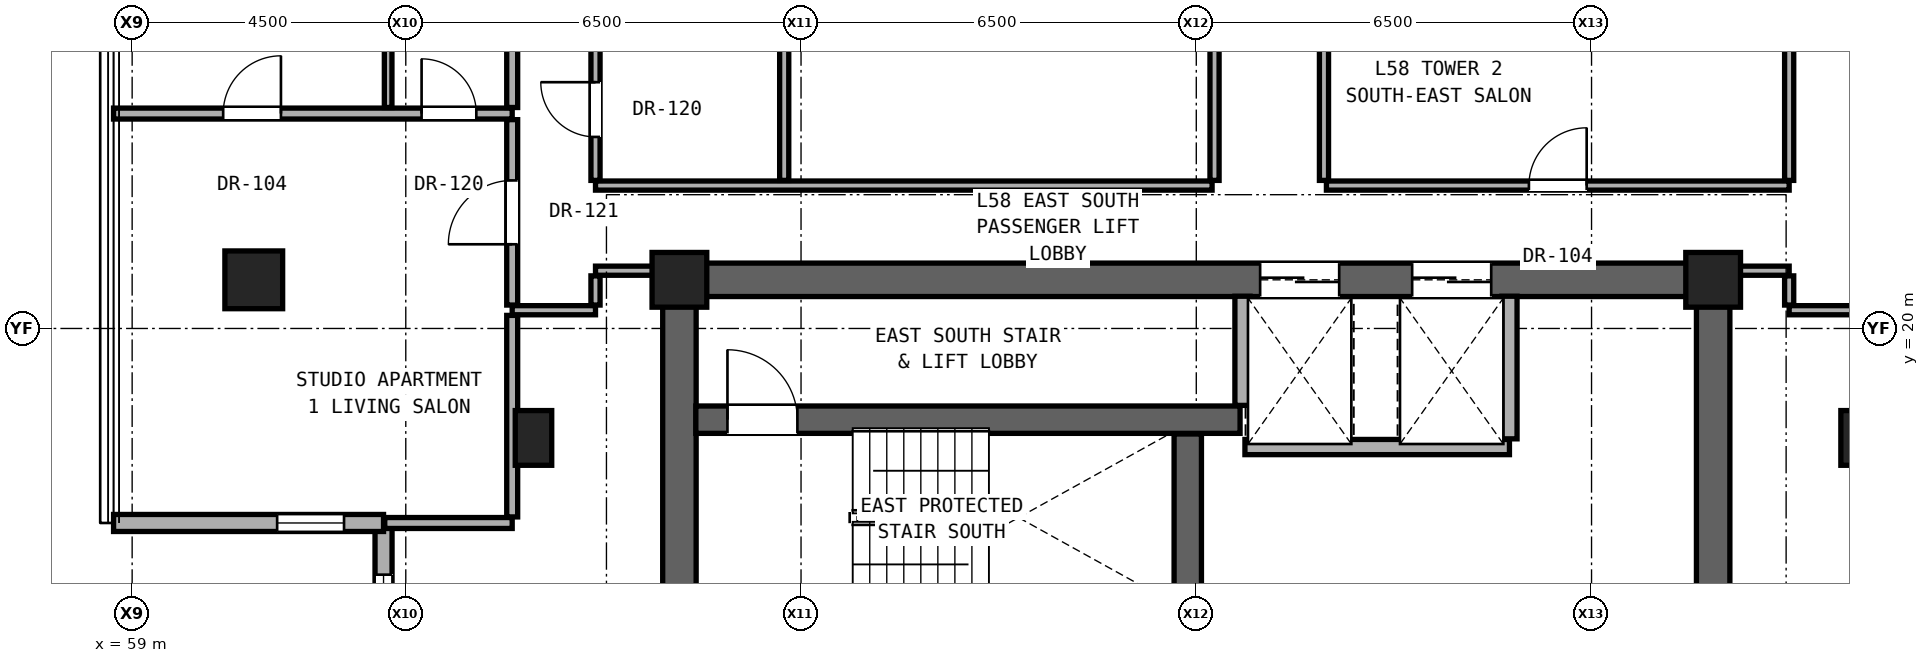
"""IFC4 building model, lengths in metres.
Left out: names, types, materials, properties, quantities, classifications, styles, units other than length and angle.
Written with IfcOpenShell. Run it as: python <this file> out.ifc"""

import sys

from ifc_helpers import new_model, si_unit, direction, frame, frame_2d, origin, origin_2d, place, context, subcontext, project, spatial, rectangle, hollow_rectangle, extrude, element, fill, save


model = new_model("IFC4")
c1 = context("Model", 3, precision=1e-05, world=origin(), true_north=direction((0.0, 1.0)))
c2 = subcontext(c1, "Body", "Model", "MODEL_VIEW")
j1 = project(units=[si_unit("LENGTHUNIT", "METRE"), si_unit("PLANEANGLEUNIT", "RADIAN")], contexts=[c1])
p1 = place(None, origin())
s1 = spatial("IfcSite", under=j1, at=p1, CompositionType="ELEMENT")
p2 = place(p1, origin())
s2 = spatial("IfcBuilding", under=s1, at=p2, CompositionType="ELEMENT")
p3 = place(p2, frame((0.0, 0.0, 203.15)))
s3 = spatial("IfcBuildingStorey", under=s2, at=p3, CompositionType="ELEMENT", Elevation=203.15)
for number, where, z_axis, x_axis in (
    (1, (68.0, 20.8, 0.0), (0.0, 0.0, 1.0), (1.0, 0.0, 0.0)),
    (2, (85.0, 20.8, 0.0), (0.0, 0.0, 1.0), (1.0, 0.0, 0.0)),
):
    element("IfcColumn", number, at=place(p3, frame(where, z_axis=z_axis, x_axis=x_axis)), inside=s3, PredefinedType="COLUMN", context=c2, shape_type="SweptSolid", body=[
        extrude(rectangle(XDim=0.9, YDim=0.9, at=origin_2d()), origin(), (0.0, 0.0, 1.0), 3.25),
    ])
p4 = place(p3, frame((61.0, 20.8, 0.0), z_axis=(0.0, 0.0, 1.0), x_axis=(1.0, 0.0, 0.0)))
e3 = element("IfcColumn", 3, at=p4, inside=s3, PredefinedType="COLUMN", context=c2, shape_type="SweptSolid", body=[
    extrude(hollow_rectangle(XDim=0.95, YDim=0.95, WallThickness=0.05, at=origin_2d()), origin(), (0.0, 0.0, 1.0), 3.25),
])
for number, where, z_axis, x_axis in (
    (4, (65.6, 18.2, 0.0), (0.0, 0.0, 1.0), (1.0, 0.0, 0.0)),
    (5, (87.4, 18.2, 0.0), (0.0, 0.0, 1.0), (1.0, 0.0, 0.0)),
):
    element("IfcColumn", number, at=place(p3, frame(where, z_axis=z_axis, x_axis=x_axis)), inside=s3, PredefinedType="PILASTER", context=c2, shape_type="SweptSolid", body=[
        extrude(rectangle(XDim=0.6, YDim=0.9, at=origin_2d()), origin(), (0.0, 0.0, 1.0), 3.25),
    ])
for number, where, z_axis, x_axis in (
    (6, (68.0, 15.2, 0.0), (0.0, 0.0, 1.0), (0.0, 1.0, 0.0)),
    (7, (85.0, 15.2, 0.0), (0.0, 0.0, 1.0), (0.0, 1.0, 0.0)),
):
    element("IfcWall", number, at=place(p3, frame(where, z_axis=z_axis, x_axis=x_axis)), inside=s3, PredefinedType="SHEAR", context=c2, shape_type="SweptSolid", body=[
        extrude(rectangle(XDim=5.6, YDim=0.55, at=frame_2d((2.8, 0.0))), origin(), (0.0, 0.0, 1.0), 3.05),
    ])
p5 = place(p3, frame((68.0, 20.8, 0.0), z_axis=(0.0, 0.0, 1.0), x_axis=(1.0, 0.0, 0.0)))
e8 = element("IfcWall", 8, at=p5, inside=s3, PredefinedType="SHEAR", context=c2, shape_type="SweptSolid", body=[
    extrude(rectangle(XDim=17.0, YDim=0.55, at=frame_2d((8.5, 0.0))), origin(), (0.0, 0.0, 1.0), 3.05),
])
p6 = place(p5, frame((9.55, 0.0, 0.0)))
e9 = element("IfcOpeningElement", 9, at=p6, cuts=e8, PredefinedType="OPENING", context=c2, shape_type="SweptSolid", body=[
    extrude(rectangle(XDim=1.3, YDim=2.3, at=frame_2d((0.65, 1.15))), frame((0.0, 0.285, 0.0), z_axis=(0.0, -1.0, 0.0), x_axis=(1.0, 0.0, 0.0)), (0.0, 0.0, 1.0), 0.57),
])
p7 = place(p5, frame((12.05, 0.0, 0.0)))
e10 = element("IfcOpeningElement", 10, at=p7, cuts=e8, PredefinedType="OPENING", context=c2, shape_type="SweptSolid", body=[
    extrude(rectangle(XDim=1.3, YDim=2.3, at=frame_2d((0.65, 1.15))), frame((0.0, 0.285, 0.0), z_axis=(0.0, -1.0, 0.0), x_axis=(1.0, 0.0, 0.0)), (0.0, 0.0, 1.0), 0.57),
])
p8 = place(p3, frame((63.134, 16.802, 0.0), z_axis=(0.0, 0.0, 1.0), x_axis=(0.0, -1.0, 0.0)))
e11 = element("IfcWall", 11, at=p8, inside=s3, PredefinedType="SOLIDWALL", context=c2, shape_type="SweptSolid", body=[
    extrude(rectangle(XDim=4.44, YDim=0.28, at=frame_2d((2.22, 0.0))), origin(), (0.0, 0.0, 1.0), 3.03),
])
p9 = place(p8, frame((0.85, 0.0, 0.68)))
e12 = element("IfcOpeningElement", 12, at=p9, cuts=e11, PredefinedType="OPENING", context=c2, shape_type="SweptSolid", body=[
    extrude(rectangle(XDim=1.35, YDim=2.2, at=frame_2d((0.675, 1.1))), frame((0.0, 0.15, 0.0), z_axis=(0.0, -1.0, 0.0), x_axis=(1.0, 0.0, 0.0)), (0.0, 0.0, 1.0), 0.3),
])
p10 = place(p3, frame((58.695, 16.802, 0.0), z_axis=(0.0, 0.0, 1.0), x_axis=(1.0, 0.0, 0.0)))
e13 = element("IfcWall", 13, at=p10, inside=s3, PredefinedType="SOLIDWALL", context=c2, shape_type="SweptSolid", body=[
    extrude(rectangle(XDim=4.44, YDim=0.28, at=frame_2d((2.22, 0.0))), origin(), (0.0, 0.0, 1.0), 3.03),
])
p11 = place(p10, frame((2.69, 0.0, 0.85)))
e14 = element("IfcOpeningElement", 14, at=p11, cuts=e13, PredefinedType="OPENING", context=c2, shape_type="SweptSolid", body=[
    extrude(rectangle(XDim=1.1, YDim=2.0, at=frame_2d((0.55, 1.0))), frame((0.0, 0.15, 0.0), z_axis=(0.0, -1.0, 0.0), x_axis=(1.0, 0.0, 0.0)), (0.0, 0.0, 1.0), 0.3),
])
p12 = place(p3, frame((63.154, 16.801, 0.0), z_axis=(0.0, 0.0, 1.0), x_axis=(1.0, 0.0, 0.0)))
e15 = element("IfcWall", 15, at=p12, inside=s3, PredefinedType="PARTITIONING", context=c2, shape_type="SweptSolid", body=[
    extrude(rectangle(XDim=2.096, YDim=0.18, at=frame_2d((1.048, 0.0))), origin(), (0.0, 0.0, 1.0), 3.05),
])
p13 = place(p3, frame((77.3, 18.05, 0.0), z_axis=(0.0, 0.0, 1.0), x_axis=(1.0, 0.0, 0.0)))
e16 = element("IfcWall", 16, at=p13, inside=s3, PredefinedType="SOLIDWALL", context=c2, shape_type="SweptSolid", body=[
    extrude(rectangle(XDim=4.35, YDim=0.25, at=frame_2d((2.175, 0.0))), origin(), (0.0, 0.0, 1.0), 3.05),
])
p14 = place(p3, frame((68.27, 18.5, 0.0), z_axis=(0.0, 0.0, 1.0), x_axis=(1.0, 0.0, 0.0)))
e17 = element("IfcWall", 17, at=p14, inside=s3, PredefinedType="SHEAR", context=c2, shape_type="SweptSolid", body=[
    extrude(rectangle(XDim=8.95, YDim=0.45, at=frame_2d((4.475, 0.0))), origin(), (0.0, 0.0, 1.0), 3.05),
])
p15 = place(p14, frame((0.52, 0.0, 0.0)))
e18 = element("IfcOpeningElement", 18, at=p15, cuts=e17, PredefinedType="OPENING", context=c2, shape_type="SweptSolid", body=[
    extrude(rectangle(XDim=1.15, YDim=2.2, at=frame_2d((0.575, 1.1))), frame((0.0, 0.235, 0.0), z_axis=(0.0, -1.0, 0.0), x_axis=(1.0, 0.0, 0.0)), (0.0, 0.0, 1.0), 0.47),
])
p16 = place(p3, frame((65.25, 20.3, 0.0), z_axis=(0.0, 0.0, 1.0), x_axis=(1.0, 0.0, 0.0)))
e19 = element("IfcWall", 19, at=p16, inside=s3, PredefinedType="PARTITIONING", context=c2, shape_type="SweptSolid", body=[
    extrude(rectangle(XDim=1.37, YDim=0.15, at=frame_2d((0.685, 0.0))), origin(), (0.0, 0.0, 1.0), 3.05),
])
p17 = place(p3, frame((86.25, 20.3, 0.0), z_axis=(0.0, 0.0, 1.0), x_axis=(1.0, 0.0, 0.0)))
e20 = element("IfcWall", 20, at=p17, inside=s3, PredefinedType="PARTITIONING", context=c2, shape_type="SweptSolid", body=[
    extrude(rectangle(XDim=1.35, YDim=0.15, at=frame_2d((0.675, 0.0))), origin(), (0.0, 0.0, 1.0), 3.05),
])
p18 = place(p3, frame((66.62, 20.95, 0.0), z_axis=(0.0, 0.0, 1.0), x_axis=(1.0, 0.0, 0.0)))
e21 = element("IfcWall", 21, at=p18, inside=s3, PredefinedType="PARTITIONING", context=c2, shape_type="SweptSolid", body=[
    extrude(rectangle(XDim=1.11, YDim=0.15, at=frame_2d((0.555, 0.0))), origin(), (0.0, 0.0, 1.0), 2.442),
])
p19 = place(p3, frame((85.27, 20.95, 0.0), z_axis=(0.0, 0.0, 1.0), x_axis=(1.0, 0.0, 0.0)))
e22 = element("IfcWall", 22, at=p19, inside=s3, PredefinedType="PARTITIONING", context=c2, shape_type="SweptSolid", body=[
    extrude(rectangle(XDim=0.98, YDim=0.15, at=frame_2d((0.49, 0.0))), origin(), (0.0, 0.0, 1.0), 2.442),
])
p20 = place(p3, frame((66.62, 22.35, 0.0), z_axis=(0.0, 0.0, 1.0), x_axis=(1.0, 0.0, 0.0)))
e23 = element("IfcWall", 23, at=p20, inside=s3, PredefinedType="PARTITIONING", context=c2, shape_type="SweptSolid", body=[
    extrude(rectangle(XDim=10.14, YDim=0.15, at=frame_2d((5.07, 0.0))), origin(), (0.0, 0.0, 1.0), 2.186),
])
p21 = place(p3, frame((78.64, 22.35, 0.0), z_axis=(0.0, 0.0, 1.0), x_axis=(1.0, 0.0, 0.0)))
e24 = element("IfcWall", 24, at=p21, inside=s3, PredefinedType="PARTITIONING", context=c2, shape_type="SweptSolid", body=[
    extrude(rectangle(XDim=7.61, YDim=0.15, at=frame_2d((3.805, 0.0))), origin(), (0.0, 0.0, 1.0), 2.186),
])
p22 = place(p21, frame((3.33, 0.0, 0.0)))
e25 = element("IfcOpeningElement", 25, at=p22, cuts=e24, PredefinedType="OPENING", context=c2, shape_type="SweptSolid", body=[
    extrude(rectangle(XDim=0.95, YDim=2.15, at=frame_2d((0.475, 1.075))), frame((0.0, 0.085, 0.0), z_axis=(0.0, -1.0, 0.0), x_axis=(1.0, 0.0, 0.0)), (0.0, 0.0, 1.0), 0.17),
])
p23 = place(p3, frame((58.694, 23.534, 0.0), z_axis=(0.0, 0.0, 1.0), x_axis=(1.0, 0.0, 0.0)))
e26 = element("IfcWall", 26, at=p23, inside=s3, PredefinedType="PARTITIONING", context=c2, shape_type="SweptSolid", body=[
    extrude(rectangle(XDim=6.556, YDim=0.18, at=frame_2d((3.278, 0.0))), origin(), (0.0, 0.0, 1.0), 2.269),
])
p24 = place(p23, frame((1.803, 0.0, 0.0)))
e27 = element("IfcOpeningElement", 27, at=p24, cuts=e26, PredefinedType="OPENING", context=c2, shape_type="SweptSolid", body=[
    extrude(rectangle(XDim=0.95, YDim=2.15, at=frame_2d((0.475, 1.075))), frame((0.0, 0.1, 0.0), z_axis=(0.0, -1.0, 0.0), x_axis=(1.0, 0.0, 0.0)), (0.0, 0.0, 1.0), 0.2),
])
p25 = place(p23, frame((5.066, 0.0, 0.0)))
e28 = element("IfcOpeningElement", 28, at=p25, cuts=e26, PredefinedType="OPENING", context=c2, shape_type="SweptSolid", body=[
    extrude(rectangle(XDim=0.9, YDim=2.1, at=frame_2d((0.45, 1.05))), frame((0.0, 0.1, 0.0), z_axis=(0.0, -1.0, 0.0), x_axis=(1.0, 0.0, 0.0)), (0.0, 0.0, 1.0), 0.2),
])
p26 = place(p3, frame((63.21, 23.634, 0.0), z_axis=(0.0, 0.0, 1.0), x_axis=(0.0, 1.0, 0.0)))
e29 = element("IfcWall", 29, at=p26, inside=s3, PredefinedType="PARTITIONING", context=c2, shape_type="SweptSolid", body=[
    extrude(rectangle(XDim=2.115, YDim=0.125, at=frame_2d((1.058, 0.0))), origin(), (0.0, 0.0, 1.0), 3.05),
])
p27 = place(p3, frame((65.25, 16.901, 0.0), z_axis=(0.0, 0.0, 1.0), x_axis=(0.0, 1.0, 0.0)))
e30 = element("IfcWall", 30, at=p27, inside=s3, PredefinedType="PARTITIONING", context=c2, shape_type="SweptSolid", body=[
    extrude(rectangle(XDim=3.314, YDim=0.18, at=frame_2d((1.657, 0.0))), origin(), (0.0, 0.0, 1.0), 2.493),
])
p28 = place(p3, frame((65.25, 20.385, 0.0), z_axis=(0.0, 0.0, 1.0), x_axis=(0.0, 1.0, 0.0)))
e31 = element("IfcWall", 31, at=p28, inside=s3, PredefinedType="PARTITIONING", context=c2, shape_type="SweptSolid", body=[
    extrude(rectangle(XDim=3.049, YDim=0.18, at=frame_2d((1.524, 0.0))), origin(), (0.0, 0.0, 1.0), 2.442),
])
p29 = place(p28, frame((1.0, 0.0, 0.0)))
e32 = element("IfcOpeningElement", 32, at=p29, cuts=e31, PredefinedType="OPENING", context=c2, shape_type="SweptSolid", body=[
    extrude(rectangle(XDim=1.05, YDim=2.2, at=frame_2d((0.525, 1.1))), frame((0.0, 0.1, 0.0), z_axis=(0.0, -1.0, 0.0), x_axis=(1.0, 0.0, 0.0)), (0.0, 0.0, 1.0), 0.2),
])
p30 = place(p3, frame((65.25, 23.634, 0.0), z_axis=(0.0, 0.0, 1.0), x_axis=(0.0, 1.0, 0.0)))
e33 = element("IfcWall", 33, at=p30, inside=s3, PredefinedType="PARTITIONING", context=c2, shape_type="SweptSolid", body=[
    extrude(rectangle(XDim=2.115, YDim=0.18, at=frame_2d((1.058, 0.0))), origin(), (0.0, 0.0, 1.0), 3.05),
])
p31 = place(p3, frame((66.62, 20.385, 0.0), z_axis=(0.0, 0.0, 1.0), x_axis=(0.0, 1.0, 0.0)))
e34 = element("IfcWall", 34, at=p31, inside=s3, PredefinedType="PARTITIONING", context=c2, shape_type="SweptSolid", body=[
    extrude(rectangle(XDim=0.48, YDim=0.15, at=frame_2d((0.24, 0.0))), origin(), (0.0, 0.0, 1.0), 2.442),
])
p32 = place(p3, frame((66.62, 22.435, 0.0), z_axis=(0.0, 0.0, 1.0), x_axis=(0.0, 1.0, 0.0)))
e35 = element("IfcWall", 35, at=p32, inside=s3, PredefinedType="PARTITIONING", context=c2, shape_type="SweptSolid", body=[
    extrude(rectangle(XDim=2.33, YDim=0.15, at=frame_2d((1.165, 0.0))), origin(), (0.0, 0.0, 1.0), 3.05),
])
p33 = place(p32, frame((0.715, 0.0, 0.0)))
e36 = element("IfcOpeningElement", 36, at=p33, cuts=e35, PredefinedType="OPENING", context=c2, shape_type="SweptSolid", body=[
    extrude(rectangle(XDim=0.9, YDim=2.1, at=frame_2d((0.45, 1.05))), frame((0.0, 0.085, 0.0), z_axis=(0.0, -1.0, 0.0), x_axis=(1.0, 0.0, 0.0)), (0.0, 0.0, 1.0), 0.17),
])
p34 = place(p3, frame((69.723, 22.435, 0.0), z_axis=(0.0, 0.0, 1.0), x_axis=(0.0, 1.0, 0.0)))
e37 = element("IfcWall", 37, at=p34, inside=s3, PredefinedType="PARTITIONING", context=c2, shape_type="SweptSolid", body=[
    extrude(rectangle(XDim=2.33, YDim=0.15, at=frame_2d((1.165, 0.0))), origin(), (0.0, 0.0, 1.0), 3.05),
])
p35 = place(p3, frame((76.36, 15.665, 0.0), z_axis=(0.0, 0.0, 1.0), x_axis=(0.0, 1.0, 0.0)))
e38 = element("IfcWall", 38, at=p35, inside=s3, PredefinedType="SHEAR", context=c2, shape_type="SweptSolid", body=[
    extrude(rectangle(XDim=2.6, YDim=0.45, at=frame_2d((1.3, 0.0))), origin(), (0.0, 0.0, 1.0), 3.05),
])
p36 = place(p3, frame((76.8, 22.435, 0.0), z_axis=(0.0, 0.0, 1.0), x_axis=(0.0, 1.0, 0.0)))
e39 = element("IfcWall", 39, at=p36, inside=s3, PredefinedType="PARTITIONING", context=c2, shape_type="SweptSolid", body=[
    extrude(rectangle(XDim=8.13, YDim=0.15, at=frame_2d((4.065, 0.0))), origin(), (0.0, 0.0, 1.0), 2.186),
])
p37 = place(p3, frame((77.26, 18.735, 0.0), z_axis=(0.0, 0.0, 1.0), x_axis=(0.0, 1.0, 0.0)))
e40 = element("IfcWall", 40, at=p37, inside=s3, PredefinedType="SOLIDWALL", context=c2, shape_type="SweptSolid", body=[
    extrude(rectangle(XDim=1.795, YDim=0.25, at=frame_2d((0.897, 0.0))), origin(), (0.0, 0.0, 1.0), 3.05),
])
p38 = place(p3, frame((78.6, 22.435, 0.0), z_axis=(0.0, 0.0, 1.0), x_axis=(0.0, 1.0, 0.0)))
e41 = element("IfcWall", 41, at=p38, inside=s3, PredefinedType="PARTITIONING", context=c2, shape_type="SweptSolid", body=[
    extrude(rectangle(XDim=3.08, YDim=0.15, at=frame_2d((1.54, 0.0))), origin(), (0.0, 0.0, 1.0), 3.05),
])
p39 = place(p3, frame((81.65, 18.185, 0.0), z_axis=(0.0, 0.0, 1.0), x_axis=(0.0, 1.0, 0.0)))
e42 = element("IfcWall", 42, at=p39, inside=s3, PredefinedType="SOLIDWALL", context=c2, shape_type="SweptSolid", body=[
    extrude(rectangle(XDim=2.345, YDim=0.25, at=frame_2d((1.172, 0.0))), origin(), (0.0, 0.0, 1.0), 3.05),
])
p40 = place(p3, frame((86.25, 20.385, 0.0), z_axis=(0.0, 0.0, 1.0), x_axis=(0.0, 1.0, 0.0)))
e43 = element("IfcWall", 43, at=p40, inside=s3, PredefinedType="PARTITIONING", context=c2, shape_type="SweptSolid", body=[
    extrude(rectangle(XDim=0.48, YDim=0.15, at=frame_2d((0.24, 0.0))), origin(), (0.0, 0.0, 1.0), 2.442),
])
p41 = place(p3, frame((86.25, 22.435, 0.0), z_axis=(0.0, 0.0, 1.0), x_axis=(0.0, 1.0, 0.0)))
e44 = element("IfcWall", 44, at=p41, inside=s3, PredefinedType="PARTITIONING", context=c2, shape_type="SweptSolid", body=[
    extrude(rectangle(XDim=3.08, YDim=0.15, at=frame_2d((1.54, 0.0))), origin(), (0.0, 0.0, 1.0), 3.05),
])
p42 = place(p9, origin())
e45 = element("IfcWindow", 45, at=p42, inside=s3, PartitioningType="SINGLE_PANEL", PredefinedType="WINDOW", context=c2, shape_type="SweptSolid", body=[
    extrude(rectangle(XDim=1.35, YDim=2.2, at=frame_2d((0.675, 1.1))), frame((0.0, 0.03, 0.0), z_axis=(0.0, -1.0, 0.0), x_axis=(1.0, 0.0, 0.0)), (0.0, 0.0, 1.0), 0.06),
])
fill(e12, e45)
p43 = place(p11, origin())
e46 = element("IfcWindow", 46, at=p43, inside=s3, PartitioningType="SINGLE_PANEL", PredefinedType="WINDOW", context=c2, shape_type="SweptSolid", body=[
    extrude(rectangle(XDim=1.1, YDim=2.0, at=frame_2d((0.55, 1.0))), frame((0.0, 0.03, 0.0), z_axis=(0.0, -1.0, 0.0), x_axis=(1.0, 0.0, 0.0)), (0.0, 0.0, 1.0), 0.06),
])
fill(e14, e46)
p44 = place(p15, origin())
e47 = element("IfcDoor", 47, at=p44, inside=s3, OperationType="SINGLE_SWING_LEFT", PredefinedType="DOOR", context=c2, shape_type="SweptSolid", body=[
    extrude(rectangle(XDim=1.15, YDim=2.2, at=frame_2d((0.575, 1.1))), frame((0.0, 0.025, 0.0), z_axis=(0.0, -1.0, 0.0), x_axis=(1.0, 0.0, 0.0)), (0.0, 0.0, 1.0), 0.05),
])
fill(e18, e47)
p45 = place(p33, origin())
e48 = element("IfcDoor", 48, at=p45, inside=s3, OperationType="SINGLE_SWING_RIGHT", PredefinedType="DOOR", context=c2, shape_type="SweptSolid", body=[
    extrude(rectangle(XDim=0.9, YDim=2.1, at=frame_2d((0.45, 1.05))), frame((0.0, 0.025, 0.0), z_axis=(0.0, -1.0, 0.0), x_axis=(1.0, 0.0, 0.0)), (0.0, 0.0, 1.0), 0.05),
])
fill(e36, e48)
p46 = place(p29, origin())
e49 = element("IfcDoor", 49, at=p46, inside=s3, OperationType="SINGLE_SWING_LEFT", PredefinedType="DOOR", context=c2, shape_type="SweptSolid", body=[
    extrude(rectangle(XDim=1.05, YDim=2.2, at=frame_2d((0.525, 1.1))), frame((0.0, 0.025, 0.0), z_axis=(0.0, -1.0, 0.0), x_axis=(1.0, 0.0, 0.0)), (0.0, 0.0, 1.0), 0.05),
])
fill(e32, e49)
p47 = place(p24, origin())
e50 = element("IfcDoor", 50, at=p47, inside=s3, OperationType="SINGLE_SWING_RIGHT", PredefinedType="DOOR", context=c2, shape_type="SweptSolid", body=[
    extrude(rectangle(XDim=0.95, YDim=2.15, at=frame_2d((0.475, 1.075))), frame((0.0, 0.025, 0.0), z_axis=(0.0, -1.0, 0.0), x_axis=(1.0, 0.0, 0.0)), (0.0, 0.0, 1.0), 0.05),
])
fill(e27, e50)
p48 = place(p25, origin())
e51 = element("IfcDoor", 51, at=p48, inside=s3, OperationType="SINGLE_SWING_LEFT", PredefinedType="DOOR", context=c2, shape_type="SweptSolid", body=[
    extrude(rectangle(XDim=0.9, YDim=2.1, at=frame_2d((0.45, 1.05))), frame((0.0, 0.025, 0.0), z_axis=(0.0, -1.0, 0.0), x_axis=(1.0, 0.0, 0.0)), (0.0, 0.0, 1.0), 0.05),
])
fill(e28, e51)
p49 = place(p22, origin())
e52 = element("IfcDoor", 52, at=p49, inside=s3, OperationType="SINGLE_SWING_RIGHT", PredefinedType="DOOR", context=c2, shape_type="SweptSolid", body=[
    extrude(rectangle(XDim=0.95, YDim=2.15, at=frame_2d((0.475, 1.075))), frame((0.0, 0.025, 0.0), z_axis=(0.0, -1.0, 0.0), x_axis=(1.0, 0.0, 0.0)), (0.0, 0.0, 1.0), 0.05),
])
fill(e25, e52)
p50 = place(p6, origin())
e53 = element("IfcDoor", 53, at=p50, inside=s3, OperationType="DOUBLE_DOOR_SLIDING", PredefinedType="DOOR", context=c2, shape_type="SweptSolid", body=[
    extrude(rectangle(XDim=1.3, YDim=2.3, at=frame_2d((0.65, 1.15))), frame((0.0, 0.025, 0.0), z_axis=(0.0, -1.0, 0.0), x_axis=(1.0, 0.0, 0.0)), (0.0, 0.0, 1.0), 0.05),
])
fill(e9, e53)
p51 = place(p7, origin())
e54 = element("IfcDoor", 54, at=p51, inside=s3, OperationType="DOUBLE_DOOR_SLIDING", PredefinedType="DOOR", context=c2, shape_type="SweptSolid", body=[
    extrude(rectangle(XDim=1.3, YDim=2.3, at=frame_2d((0.65, 1.15))), frame((0.0, 0.025, 0.0), z_axis=(0.0, -1.0, 0.0), x_axis=(1.0, 0.0, 0.0)), (0.0, 0.0, 1.0), 0.05),
])
fill(e10, e54)
save(model, sys.argv[1])
